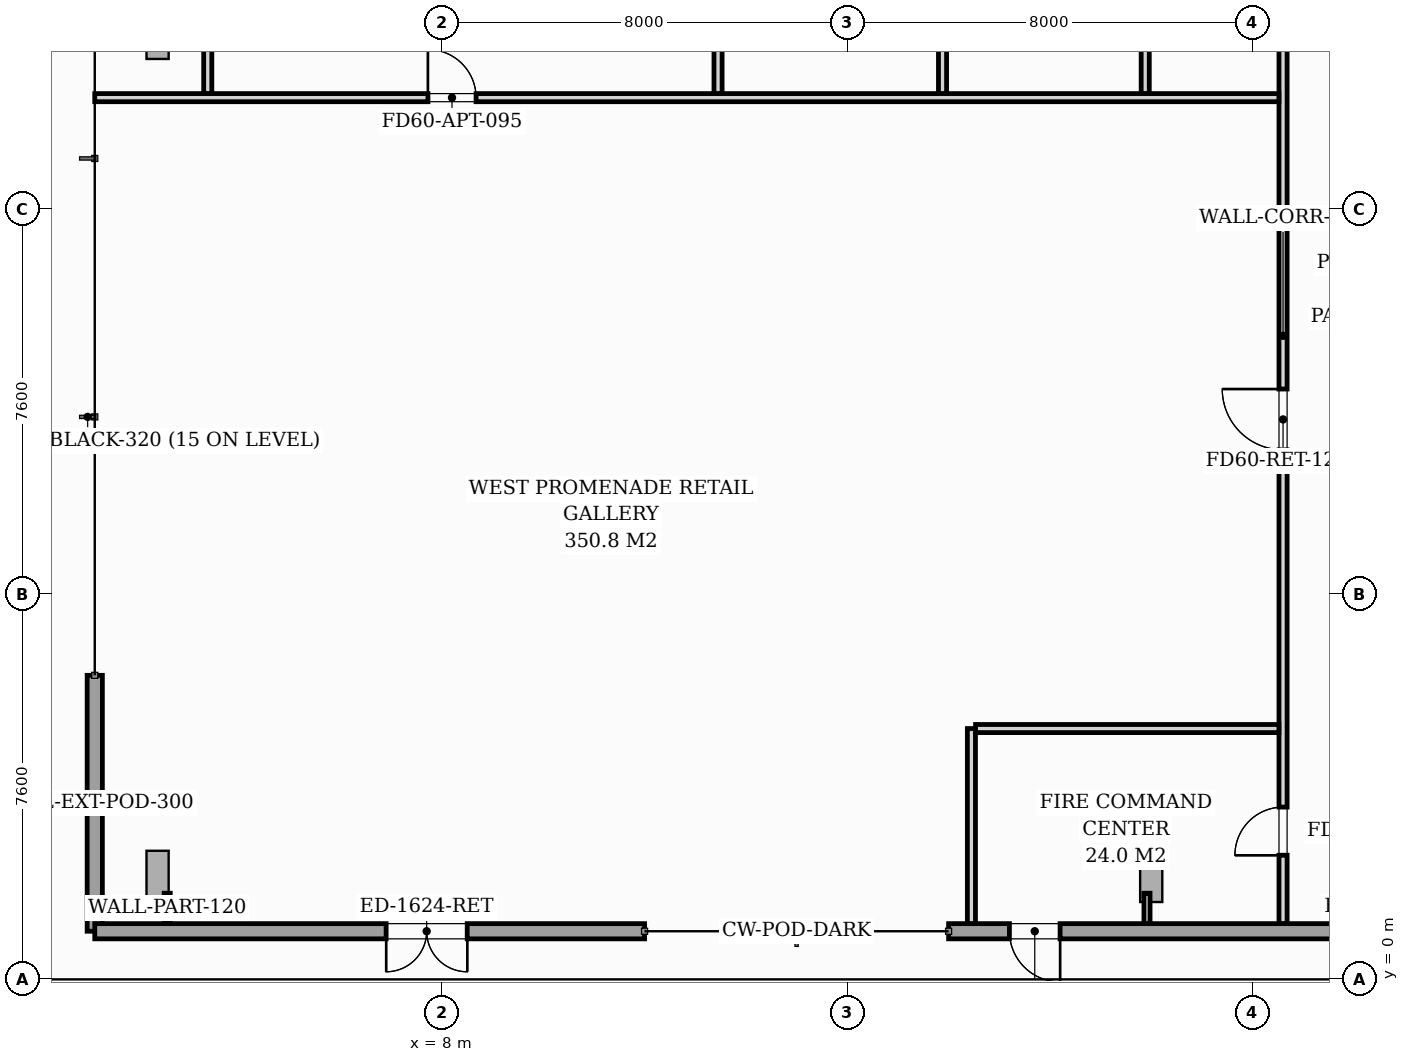
"""IFC4 building model, lengths in metres.
Left out: names, types, materials, properties, quantities, classifications, styles, units other than length and angle.
Written with IfcOpenShell. Run it as: python <this file> out.ifc"""

import sys

from ifc_helpers import new_model, si_unit, direction, frame, frame_2d, origin, origin_2d, place, context, subcontext, project, spatial, rectangle, i_section, extrude, source, transform, mapped, element, fill, save


model = new_model("IFC4")
c1 = context("Model", 3, precision=1e-05, world=origin(), true_north=direction((0.0, 1.0)))
c2 = subcontext(c1, "Body", "Model", "MODEL_VIEW")
j1 = project(units=[si_unit("LENGTHUNIT", "METRE"), si_unit("PLANEANGLEUNIT", "RADIAN")], contexts=[c1])
p1 = place(None, origin())
s1 = spatial("IfcSite", under=j1, at=p1, CompositionType="ELEMENT")
p2 = place(p1, origin())
s2 = spatial("IfcBuilding", under=s1, at=p2, CompositionType="ELEMENT")
p3 = place(p2, origin())
s3 = spatial("IfcBuildingStorey", under=s2, at=p3, CompositionType="ELEMENT", Elevation=0.0)
m1 = source(origin(), c2, "Body", "SweptSolid", [
    extrude(i_section(OverallWidth=0.438, OverallDepth=1.011, WebThickness=0.041, FlangeThickness=0.074, FilletRadius=0.024, at=origin_2d()), origin(), (0.0, 0.0, 1.0), 4.551),
])
p4 = place(p3, frame((2.189, 1.982, 0.051), z_axis=(0.171898318793, 0.042974579698, 0.984176891365), x_axis=(-0.954791829974, -0.238697957493, 0.177188731312)))
e1 = element("IfcColumn", 1, at=p4, inside=s3, PredefinedType="COLUMN", context=c2, shape_type="MappedRepresentation", body=[
    mapped(m1, transform((0.0, 0.0, 0.0), scale=1.0)),
])
m2 = source(origin(), c2, "Body", "SweptSolid", [
    extrude(i_section(OverallWidth=0.438, OverallDepth=1.011, WebThickness=0.041, FlangeThickness=0.074, FilletRadius=0.024, at=origin_2d()), origin(), (0.0, 0.0, 1.0), 4.535),
])
p5 = place(p3, frame((22.088, 1.981, 0.031), z_axis=(-0.076121654642, 0.043498088367, 0.996149291022), x_axis=(0.864899790462, -0.494228451692, 0.087673199994)))
e2 = element("IfcColumn", 2, at=p5, inside=s3, PredefinedType="COLUMN", context=c2, shape_type="MappedRepresentation", body=[
    mapped(m2, transform((0.0, 0.0, 0.0), scale=1.0)),
])
m3 = source(origin(), c2, "Body", "SweptSolid", [
    extrude(i_section(OverallWidth=0.438, OverallDepth=1.011, WebThickness=0.041, FlangeThickness=0.074, FilletRadius=0.024, at=origin_2d()), origin(), (0.0, 0.0, 1.0), 4.562),
])
p6 = place(p3, frame((2.19, 18.794, 0.056), z_axis=(0.171106284993, -0.10693473801, 0.979432285073), x_axis=(-0.830571511647, 0.519074720135, 0.201773137353)))
e3 = element("IfcColumn", 3, at=p6, inside=s3, PredefinedType="COLUMN", context=c2, shape_type="MappedRepresentation", body=[
    mapped(m3, transform((0.0, 0.0, 0.0), scale=1.0)),
])
p7 = place(p3, frame((1.15, 0.95, 0.0), z_axis=(0.0, 0.0, 1.0), x_axis=(0.0, 1.0, 0.0)))
e4 = element("IfcWall", 4, at=p7, inside=s3, PredefinedType="STANDARD", context=c2, shape_type="SweptSolid", body=[
    extrude(rectangle(XDim=5.05, YDim=0.3, at=frame_2d((2.525, 0.0))), origin(), (0.0, 0.0, 1.0), 4.58),
])
p8 = place(p3, frame((47.0, 0.95, 0.0), z_axis=(0.0, 0.0, 1.0), x_axis=(-1.0, 0.0, 0.0)))
e5 = element("IfcWall", 5, at=p8, inside=s3, PredefinedType="STANDARD", context=c2, shape_type="SweptSolid", body=[
    extrude(rectangle(XDim=29.0, YDim=0.3, at=frame_2d((14.5, 0.0))), origin(), (0.0, 0.0, 1.0), 4.58),
])
p9 = place(p8, frame((1.15, 0.0, 0.0)))
e6 = element("IfcOpeningElement", 6, at=p9, cuts=e5, PredefinedType="OPENING", context=c2, shape_type="SweptSolid", body=[
    extrude(rectangle(XDim=1.8, YDim=2.4, at=frame_2d((0.9, 1.2))), frame((0.0, 0.16, 0.0), z_axis=(0.0, -1.0, 0.0), x_axis=(1.0, 0.0, 0.0)), (0.0, 0.0, 1.0), 0.32),
])
p10 = place(p8, frame((9.2, 0.0, 0.0)))
e7 = element("IfcOpeningElement", 7, at=p10, cuts=e5, PredefinedType="OPENING", context=c2, shape_type="SweptSolid", body=[
    extrude(rectangle(XDim=1.8, YDim=2.4, at=frame_2d((0.9, 1.2))), frame((0.0, 0.16, 0.0), z_axis=(0.0, -1.0, 0.0), x_axis=(1.0, 0.0, 0.0)), (0.0, 0.0, 1.0), 0.32),
])
p11 = place(p8, frame((11.3, 0.0, 0.65)))
e8 = element("IfcOpeningElement", 8, at=p11, cuts=e5, PredefinedType="OPENING", context=c2, shape_type="SweptSolid", body=[
    extrude(rectangle(XDim=2.0, YDim=2.4, at=frame_2d((1.0, 1.2))), frame((0.0, 0.16, 0.0), z_axis=(0.0, -1.0, 0.0), x_axis=(1.0, 0.0, 0.0)), (0.0, 0.0, 1.0), 0.32),
])
p12 = place(p8, frame((13.6, 0.0, 0.0)))
e9 = element("IfcOpeningElement", 9, at=p12, cuts=e5, PredefinedType="OPENING", context=c2, shape_type="SweptSolid", body=[
    extrude(rectangle(XDim=1.8, YDim=2.4, at=frame_2d((0.9, 1.2))), frame((0.0, 0.16, 0.0), z_axis=(0.0, -1.0, 0.0), x_axis=(1.0, 0.0, 0.0)), (0.0, 0.0, 1.0), 0.32),
])
p13 = place(p8, frame((19.3, 0.0, 0.0)))
e10 = element("IfcOpeningElement", 10, at=p13, cuts=e5, PredefinedType="OPENING", context=c2, shape_type="SweptSolid", body=[
    extrude(rectangle(XDim=1.8, YDim=2.4, at=frame_2d((0.9, 1.2))), frame((0.0, 0.16, 0.0), z_axis=(0.0, -1.0, 0.0), x_axis=(1.0, 0.0, 0.0)), (0.0, 0.0, 1.0), 0.32),
])
p14 = place(p8, frame((26.8, 0.0, 0.0)))
e11 = element("IfcOpeningElement", 11, at=p14, cuts=e5, PredefinedType="OPENING", context=c2, shape_type="SweptSolid", body=[
    extrude(rectangle(XDim=1.0, YDim=2.2, at=frame_2d((0.5, 1.1))), frame((0.0, 0.16, 0.0), z_axis=(0.0, -1.0, 0.0), x_axis=(1.0, 0.0, 0.0)), (0.0, 0.0, 1.0), 0.32),
])
p15 = place(p3, frame((12.0, 0.95, 0.0), z_axis=(0.0, 0.0, 1.0), x_axis=(-1.0, 0.0, 0.0)))
e12 = element("IfcWall", 12, at=p15, inside=s3, PredefinedType="STANDARD", context=c2, shape_type="SweptSolid", body=[
    extrude(rectangle(XDim=10.85, YDim=0.3, at=frame_2d((5.425, 0.0))), origin(), (0.0, 0.0, 1.0), 4.58),
])
p16 = place(p15, frame((3.5, 0.0, 0.0)))
e13 = element("IfcOpeningElement", 13, at=p16, cuts=e12, PredefinedType="OPENING", context=c2, shape_type="SweptSolid", body=[
    extrude(rectangle(XDim=1.6, YDim=2.4, at=frame_2d((0.8, 1.2))), frame((0.0, 0.16, 0.0), z_axis=(0.0, -1.0, 0.0), x_axis=(1.0, 0.0, 0.0)), (0.0, 0.0, 1.0), 0.32),
])
p17 = place(p3, frame((24.6, 1.102, 0.0), z_axis=(0.0, 0.0, 1.0), x_axis=(0.0, 1.0, 0.0)))
e14 = element("IfcWall", 14, at=p17, inside=s3, PredefinedType="PARTITIONING", context=c2, shape_type="SweptSolid", body=[
    extrude(rectangle(XDim=23.198, YDim=0.16, at=frame_2d((11.599, 0.0))), origin(), (0.0, 0.0, 1.0), 4.58),
])
p18 = place(p17, frame((1.348, 0.0, 0.0)))
e15 = element("IfcOpeningElement", 15, at=p18, cuts=e14, PredefinedType="OPENING", context=c2, shape_type="SweptSolid", body=[
    extrude(rectangle(XDim=0.95, YDim=2.06, at=frame_2d((0.475, 1.03))), frame((0.0, 0.09, 0.0), z_axis=(0.0, -1.0, 0.0), x_axis=(1.0, 0.0, 0.0)), (0.0, 0.0, 1.0), 0.18),
])
p19 = place(p17, frame((9.348, 0.0, 0.0)))
e16 = element("IfcOpeningElement", 16, at=p19, cuts=e14, PredefinedType="OPENING", context=c2, shape_type="SweptSolid", body=[
    extrude(rectangle(XDim=1.2, YDim=2.08, at=frame_2d((0.6, 1.04))), frame((0.0, 0.09, 0.0), z_axis=(0.0, -1.0, 0.0), x_axis=(1.0, 0.0, 0.0)), (0.0, 0.0, 1.0), 0.18),
])
p20 = place(p17, frame((21.138, 0.0, 0.0)))
e17 = element("IfcOpeningElement", 17, at=p20, cuts=e14, PredefinedType="OPENING", context=c2, shape_type="SweptSolid", body=[
    extrude(rectangle(XDim=0.95, YDim=2.06, at=frame_2d((0.475, 1.03))), frame((0.0, 0.09, 0.0), z_axis=(0.0, -1.0, 0.0), x_axis=(1.0, 0.0, 0.0)), (0.0, 0.0, 1.0), 0.18),
])
p21 = place(p3, frame((18.45, 1.102, 0.0), z_axis=(0.0, 0.0, 1.0), x_axis=(0.0, 1.0, 0.0)))
e18 = element("IfcWall", 18, at=p21, inside=s3, PredefinedType="PARTITIONING", context=c2, shape_type="SweptSolid", body=[
    extrude(rectangle(XDim=3.848, YDim=0.16, at=frame_2d((1.924, 0.0))), origin(), (0.0, 0.0, 1.0), 4.58),
])
p22 = place(p3, frame((18.532, 4.95, 0.0), z_axis=(0.0, 0.0, 1.0), x_axis=(1.0, 0.0, 0.0)))
e19 = element("IfcWall", 19, at=p22, inside=s3, PredefinedType="PARTITIONING", context=c2, shape_type="SweptSolid", body=[
    extrude(rectangle(XDim=5.986, YDim=0.16, at=frame_2d((2.993, 0.0))), origin(), (0.0, 0.0, 1.0), 4.58),
])
p23 = place(p3, frame((1.15, 17.4, 0.0), z_axis=(0.0, 0.0, 1.0), x_axis=(1.0, 0.0, 0.0)))
e20 = element("IfcWall", 20, at=p23, inside=s3, PredefinedType="PARTITIONING", context=c2, shape_type="SweptSolid", body=[
    extrude(rectangle(XDim=23.368, YDim=0.16, at=frame_2d((11.684, 0.0))), origin(), (0.0, 0.0, 1.0), 3.536),
])
p24 = place(p23, frame((6.575, 0.0, 0.0)))
e21 = element("IfcOpeningElement", 21, at=p24, cuts=e20, PredefinedType="OPENING", context=c2, shape_type="SweptSolid", body=[
    extrude(rectangle(XDim=0.95, YDim=2.06, at=frame_2d((0.475, 1.03))), frame((0.0, 0.09, 0.0), z_axis=(0.0, -1.0, 0.0), x_axis=(1.0, 0.0, 0.0)), (0.0, 0.0, 1.0), 0.18),
])
p25 = place(p3, frame((3.38, 17.482, 0.0), z_axis=(0.0, 0.0, 1.0), x_axis=(0.0, 1.0, 0.0)))
e22 = element("IfcWall", 22, at=p25, inside=s3, PredefinedType="PARTITIONING", context=c2, shape_type="SweptSolid", body=[
    extrude(rectangle(XDim=6.736, YDim=0.16, at=frame_2d((3.368, 0.0))), origin(), (0.0, 0.0, 1.0), 4.58),
])
p26 = place(p25, frame((3.118, 0.0, 0.0)))
e23 = element("IfcOpeningElement", 23, at=p26, cuts=e22, PredefinedType="OPENING", context=c2, shape_type="SweptSolid", body=[
    extrude(rectangle(XDim=0.8, YDim=2.05, at=frame_2d((0.4, 1.025))), frame((0.0, 0.09, 0.0), z_axis=(0.0, -1.0, 0.0), x_axis=(1.0, 0.0, 0.0)), (0.0, 0.0, 1.0), 0.18),
])
for number, where, z_axis, x_axis in (
    (24, (13.45, 17.482, 0.0), (0.0, 0.0, 1.0), (0.0, 1.0, 0.0)),
    (25, (17.88, 17.482, 0.0), (0.0, 0.0, 1.0), (0.0, 1.0, 0.0)),
    (26, (21.88, 17.482, 0.0), (0.0, 0.0, 1.0), (0.0, 1.0, 0.0)),
):
    element("IfcWall", number, at=place(p3, frame(where, z_axis=z_axis, x_axis=x_axis)), inside=s3, PredefinedType="PARTITIONING", context=c2, shape_type="SweptSolid", body=[
        extrude(rectangle(XDim=4.516, YDim=0.16, at=frame_2d((2.258, 0.0))), origin(), (0.0, 0.0, 1.0), 4.58),
    ])
for number, where, z_axis, x_axis in (
    (27, (2.58, 1.7, 0.0), (0.0, 0.0, 1.0), (0.0, -1.0, 0.0)),
    (28, (21.915, 1.7, 0.0), (0.0, 0.0, 1.0), (0.0, -1.0, 0.0)),
):
    element("IfcWall", number, at=place(p3, frame(where, z_axis=z_axis, x_axis=x_axis)), inside=s3, PredefinedType="PARTITIONING", context=c2, shape_type="SweptSolid", body=[
        extrude(rectangle(XDim=0.598, YDim=0.12, at=frame_2d((0.299, 0.0))), origin(), (0.0, 0.0, 1.0), 4.58),
    ])
m4 = source(origin(), c2, "Body", "SweptSolid", [
    extrude(rectangle(XDim=1.0, YDim=2.2, at=frame_2d((0.5, 1.1))), frame((0.0, 0.025, 0.0), z_axis=(0.0, -1.0, 0.0), x_axis=(1.0, 0.0, 0.0)), (0.0, 0.0, 1.0), 0.05),
])
p27 = place(p14, origin())
e29 = element("IfcDoor", 29, at=p27, inside=s3, OperationType="SINGLE_SWING_LEFT", PredefinedType="DOOR", context=c2, shape_type="MappedRepresentation", body=[
    mapped(m4, transform((0.0, 0.0, 0.0), scale=1.0)),
])
fill(e11, e29)
m5 = source(origin(), c2, "Body", "SweptSolid", [
    extrude(rectangle(XDim=1.6, YDim=2.4, at=frame_2d((0.8, 1.2))), frame((0.0, 0.025, 0.0), z_axis=(0.0, -1.0, 0.0), x_axis=(1.0, 0.0, 0.0)), (0.0, 0.0, 1.0), 0.05),
])
p28 = place(p16, origin())
e30 = element("IfcDoor", 30, at=p28, inside=s3, OperationType="DOUBLE_DOOR_SINGLE_SWING", PredefinedType="DOOR", context=c2, shape_type="MappedRepresentation", body=[
    mapped(m5, transform((0.0, 0.0, 0.0), scale=1.0)),
])
fill(e13, e30)
m6 = source(origin(), c2, "Body", "SweptSolid", [
    extrude(rectangle(XDim=0.95, YDim=2.06, at=frame_2d((0.475, 1.03))), frame((0.0, 0.025, 0.0), z_axis=(0.0, -1.0, 0.0), x_axis=(1.0, 0.0, 0.0)), (0.0, 0.0, 1.0), 0.05),
])
p29 = place(p18, origin())
e31 = element("IfcDoor", 31, at=p29, inside=s3, OperationType="SINGLE_SWING_LEFT", PredefinedType="DOOR", context=c2, shape_type="MappedRepresentation", body=[
    mapped(m6, transform((0.0, 0.0, 0.0), scale=1.0)),
])
fill(e15, e31)
m7 = source(origin(), c2, "Body", "SweptSolid", [
    extrude(rectangle(XDim=1.2, YDim=2.08, at=frame_2d((0.6, 1.04))), frame((0.0, 0.025, 0.0), z_axis=(0.0, -1.0, 0.0), x_axis=(1.0, 0.0, 0.0)), (0.0, 0.0, 1.0), 0.05),
])
p30 = place(p19, origin())
e32 = element("IfcDoor", 32, at=p30, inside=s3, OperationType="SINGLE_SWING_RIGHT", PredefinedType="DOOR", context=c2, shape_type="MappedRepresentation", body=[
    mapped(m7, transform((0.0, 0.0, 0.0), scale=1.0)),
])
fill(e16, e32)
m8 = source(origin(), c2, "Body", "SweptSolid", [
    extrude(rectangle(XDim=0.95, YDim=2.06, at=frame_2d((0.475, 1.03))), frame((0.0, 0.025, 0.0), z_axis=(0.0, -1.0, 0.0), x_axis=(1.0, 0.0, 0.0)), (0.0, 0.0, 1.0), 0.05),
])
p31 = place(p24, origin())
e33 = element("IfcDoor", 33, at=p31, inside=s3, OperationType="SINGLE_SWING_LEFT", PredefinedType="DOOR", context=c2, shape_type="MappedRepresentation", body=[
    mapped(m8, transform((0.0, 0.0, 0.0), scale=1.0)),
])
fill(e21, e33)
save(model, sys.argv[1])
